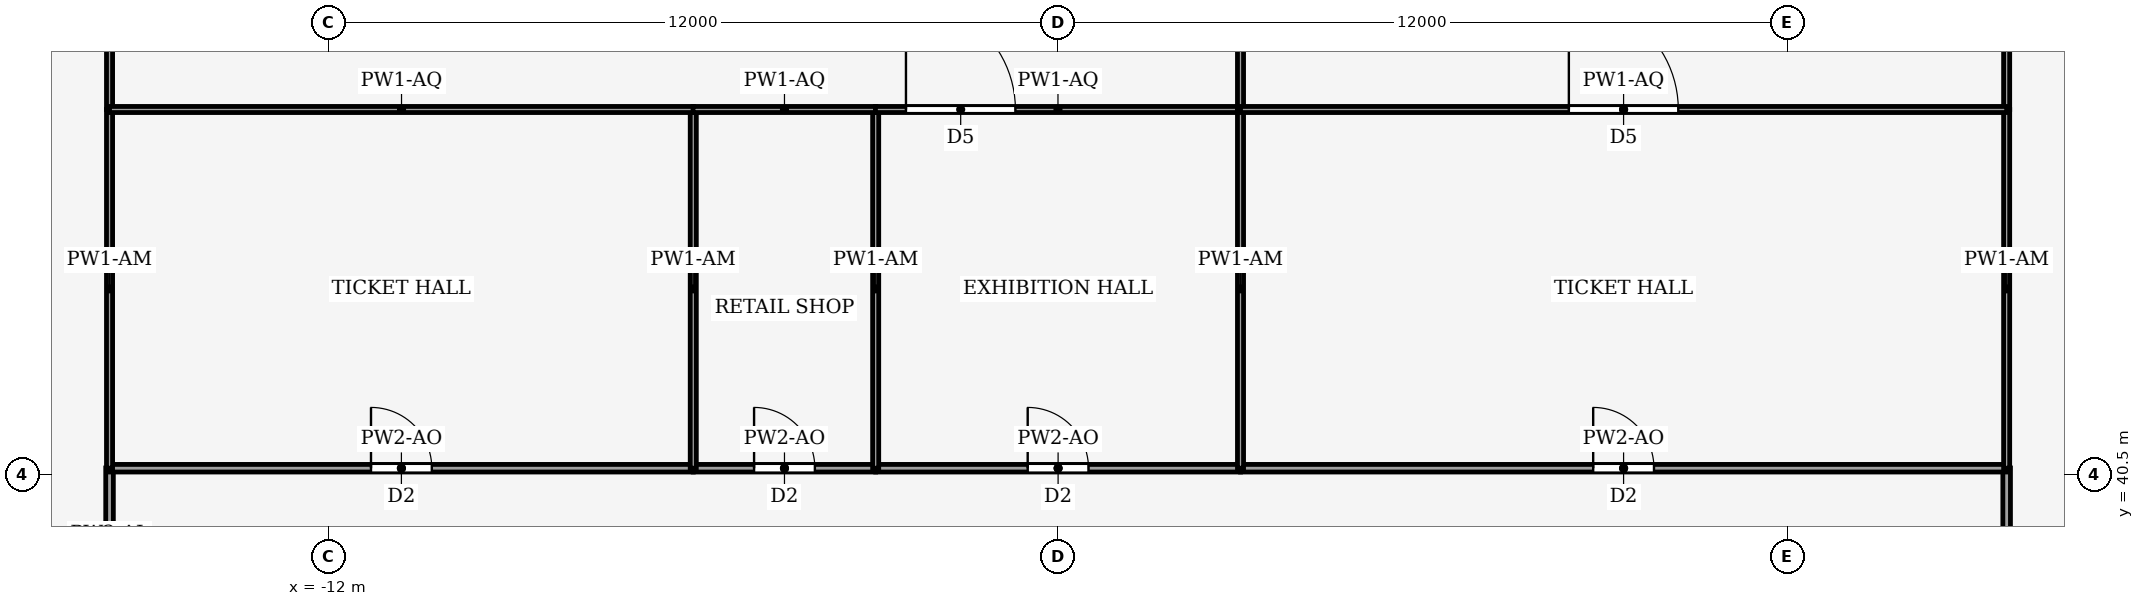
"""IFC4 building model, lengths in metres.
Left out: names, types, materials, properties, quantities, classifications, styles, units other than length and angle.
Written with IfcOpenShell. Run it as: python <this file> out.ifc"""

import sys

from ifc_helpers import new_model, si_unit, direction, frame, frame_2d, origin, place, context, subcontext, project, spatial, rectangle, extrude, element, fill, save


model = new_model("IFC4")
c1 = context("Model", 3, precision=1e-05, world=origin(), true_north=direction((0.0, 1.0)))
c2 = subcontext(c1, "Body", "Model", "MODEL_VIEW")
j1 = project(units=[si_unit("LENGTHUNIT", "METRE"), si_unit("PLANEANGLEUNIT", "RADIAN")], contexts=[c1])
p1 = place(None, origin())
s1 = spatial("IfcSite", under=j1, at=p1, CompositionType="ELEMENT")
p2 = place(p1, origin())
s2 = spatial("IfcBuilding", under=s1, at=p2, CompositionType="ELEMENT")
p3 = place(p2, frame((0.0, 0.0, 334.0)))
s3 = spatial("IfcBuildingStorey", under=s2, at=p3, CompositionType="ELEMENT", Elevation=334.0)
p4 = place(p3, frame((-15.6, 37.5, 0.0), z_axis=(0.0, 0.0, 1.0), x_axis=(0.0, 1.0, 0.0)))
e1 = element("IfcWall", 1, at=p4, inside=s3, PredefinedType="PARTITIONING", context=c2, shape_type="SweptSolid", body=[
    extrude(rectangle(XDim=3.104, YDim=0.125, at=frame_2d((1.552, 0.0))), origin(), (0.0, 0.0, 1.0), 5.62),
])
p5 = place(p4, frame((0.252, 0.0, 0.0)))
e2 = element("IfcOpeningElement", 2, at=p5, cuts=e1, PredefinedType="OPENING", context=c2, shape_type="SweptSolid", body=[
    extrude(rectangle(XDim=1.0, YDim=2.1, at=frame_2d((0.5, 1.05))), frame((0.0, 0.073, 0.0), z_axis=(0.0, -1.0, 0.0), x_axis=(1.0, 0.0, 0.0)), (0.0, 0.0, 1.0), 0.145),
])
p6 = place(p3, frame((15.6, 40.604, 0.0), z_axis=(0.0, 0.0, 1.0), x_axis=(0.0, -1.0, 0.0)))
e3 = element("IfcWall", 3, at=p6, inside=s3, PredefinedType="PARTITIONING", context=c2, shape_type="SweptSolid", body=[
    extrude(rectangle(XDim=6.104, YDim=0.125, at=frame_2d((3.052, 0.0))), origin(), (0.0, 0.0, 1.0), 5.62),
])
p7 = place(p6, frame((2.552, 0.0, 0.0)))
e4 = element("IfcOpeningElement", 4, at=p7, cuts=e3, PredefinedType="OPENING", context=c2, shape_type="SweptSolid", body=[
    extrude(rectangle(XDim=1.0, YDim=2.1, at=frame_2d((0.5, 1.05))), frame((0.0, 0.073, 0.0), z_axis=(0.0, -1.0, 0.0), x_axis=(1.0, 0.0, 0.0)), (0.0, 0.0, 1.0), 0.145),
])
p8 = place(p3, frame((-15.6, 40.6, 0.0), z_axis=(0.0, 0.0, 1.0), x_axis=(1.0, 0.0, 0.0)))
e5 = element("IfcWall", 5, at=p8, inside=s3, PredefinedType="PARTITIONING", context=c2, shape_type="SweptSolid", body=[
    extrude(rectangle(XDim=9.6, YDim=0.125, at=frame_2d((4.8, 0.0))), origin(), (0.0, 0.0, 1.0), 5.87),
])
p9 = place(p8, frame((4.3, 0.0, 0.0)))
e6 = element("IfcOpeningElement", 6, at=p9, cuts=e5, PredefinedType="OPENING", context=c2, shape_type="SweptSolid", body=[
    extrude(rectangle(XDim=1.0, YDim=2.1, at=frame_2d((0.5, 1.05))), frame((0.0, 0.073, 0.0), z_axis=(0.0, -1.0, 0.0), x_axis=(1.0, 0.0, 0.0)), (0.0, 0.0, 1.0), 0.145),
])
p10 = place(p3, frame((-6.0, 40.6, 0.0), z_axis=(0.0, 0.0, 1.0), x_axis=(1.0, 0.0, 0.0)))
e7 = element("IfcWall", 7, at=p10, inside=s3, PredefinedType="PARTITIONING", context=c2, shape_type="SweptSolid", body=[
    extrude(rectangle(XDim=3.0, YDim=0.125, at=frame_2d((1.5, 0.0))), origin(), (0.0, 0.0, 1.0), 5.87),
])
p11 = place(p10, frame((1.0, 0.0, 0.0)))
e8 = element("IfcOpeningElement", 8, at=p11, cuts=e7, PredefinedType="OPENING", context=c2, shape_type="SweptSolid", body=[
    extrude(rectangle(XDim=1.0, YDim=2.1, at=frame_2d((0.5, 1.05))), frame((0.0, 0.073, 0.0), z_axis=(0.0, -1.0, 0.0), x_axis=(1.0, 0.0, 0.0)), (0.0, 0.0, 1.0), 0.145),
])
p12 = place(p3, frame((-3.0, 40.6, 0.0), z_axis=(0.0, 0.0, 1.0), x_axis=(1.0, 0.0, 0.0)))
e9 = element("IfcWall", 9, at=p12, inside=s3, PredefinedType="PARTITIONING", context=c2, shape_type="SweptSolid", body=[
    extrude(rectangle(XDim=6.0, YDim=0.125, at=frame_2d((3.0, 0.0))), origin(), (0.0, 0.0, 1.0), 5.87),
])
p13 = place(p12, frame((2.5, 0.0, 0.0)))
e10 = element("IfcOpeningElement", 10, at=p13, cuts=e9, PredefinedType="OPENING", context=c2, shape_type="SweptSolid", body=[
    extrude(rectangle(XDim=1.0, YDim=2.1, at=frame_2d((0.5, 1.05))), frame((0.0, 0.073, 0.0), z_axis=(0.0, -1.0, 0.0), x_axis=(1.0, 0.0, 0.0)), (0.0, 0.0, 1.0), 0.145),
])
p14 = place(p3, frame((3.0, 40.6, 0.0), z_axis=(0.0, 0.0, 1.0), x_axis=(1.0, 0.0, 0.0)))
e11 = element("IfcWall", 11, at=p14, inside=s3, PredefinedType="PARTITIONING", context=c2, shape_type="SweptSolid", body=[
    extrude(rectangle(XDim=12.6, YDim=0.125, at=frame_2d((6.3, 0.0))), origin(), (0.0, 0.0, 1.0), 5.87),
])
p15 = place(p14, frame((5.8, 0.0, 0.0)))
e12 = element("IfcOpeningElement", 12, at=p15, cuts=e11, PredefinedType="OPENING", context=c2, shape_type="SweptSolid", body=[
    extrude(rectangle(XDim=1.0, YDim=2.1, at=frame_2d((0.5, 1.05))), frame((0.0, 0.073, 0.0), z_axis=(0.0, -1.0, 0.0), x_axis=(1.0, 0.0, 0.0)), (0.0, 0.0, 1.0), 0.145),
])
p16 = place(p3, frame((-15.6, 40.6, 0.0), z_axis=(0.0, 0.0, 1.0), x_axis=(0.0, 1.0, 0.0)))
e13 = element("IfcWall", 13, at=p16, inside=s3, PredefinedType="PARTITIONING", context=c2, shape_type="SweptSolid", body=[
    extrude(rectangle(XDim=5.9, YDim=0.1, at=frame_2d((2.95, 0.0))), origin(), (0.0, 0.0, 1.0), 6.35),
])
p17 = place(p3, frame((-15.6, 46.5, 0.0), z_axis=(0.0, 0.0, 1.0), x_axis=(0.0, 1.0, 0.0)))
e14 = element("IfcWall", 14, at=p17, inside=s3, PredefinedType="PARTITIONING", context=c2, shape_type="SweptSolid", body=[
    extrude(rectangle(XDim=15.0, YDim=0.1, at=frame_2d((7.5, 0.0))), origin(), (0.0, 0.0, 1.0), 5.83),
])
p18 = place(p3, frame((15.6, 46.5, 0.0), z_axis=(0.0, 0.0, 1.0), x_axis=(0.0, -1.0, 0.0)))
e15 = element("IfcWall", 15, at=p18, inside=s3, PredefinedType="PARTITIONING", context=c2, shape_type="SweptSolid", body=[
    extrude(rectangle(XDim=5.9, YDim=0.1, at=frame_2d((2.95, 0.0))), origin(), (0.0, 0.0, 1.0), 6.35),
])
p19 = place(p3, frame((15.6, 64.5, 0.0), z_axis=(0.0, 0.0, 1.0), x_axis=(0.0, -1.0, 0.0)))
e16 = element("IfcWall", 16, at=p19, inside=s3, PredefinedType="PARTITIONING", context=c2, shape_type="SweptSolid", body=[
    extrude(rectangle(XDim=18.0, YDim=0.1, at=frame_2d((9.0, 0.0))), origin(), (0.0, 0.0, 1.0), 5.83),
])
p20 = place(p3, frame((-6.0, 40.6, 0.0), z_axis=(0.0, 0.0, 1.0), x_axis=(0.0, 1.0, 0.0)))
e17 = element("IfcWall", 17, at=p20, inside=s3, PredefinedType="PARTITIONING", context=c2, shape_type="SweptSolid", body=[
    extrude(rectangle(XDim=5.9, YDim=0.1, at=frame_2d((2.95, 0.0))), origin(), (0.0, 0.0, 1.0), 6.35),
])
p21 = place(p3, frame((-5.996, 46.5, 0.0), z_axis=(0.0, 0.0, 1.0), x_axis=(-1.0, 0.0, 0.0)))
e18 = element("IfcWall", 18, at=p21, inside=s3, PredefinedType="PARTITIONING", context=c2, shape_type="SweptSolid", body=[
    extrude(rectangle(XDim=9.604, YDim=0.1, at=frame_2d((4.802, 0.0))), origin(), (0.0, 0.0, 1.0), 5.87),
])
p22 = place(p3, frame((-3.0, 40.6, 0.0), z_axis=(0.0, 0.0, 1.0), x_axis=(0.0, 1.0, 0.0)))
e19 = element("IfcWall", 19, at=p22, inside=s3, PredefinedType="PARTITIONING", context=c2, shape_type="SweptSolid", body=[
    extrude(rectangle(XDim=5.9, YDim=0.1, at=frame_2d((2.95, 0.0))), origin(), (0.0, 0.0, 1.0), 6.35),
])
p23 = place(p3, frame((-2.996, 46.5, 0.0), z_axis=(0.0, 0.0, 1.0), x_axis=(-1.0, 0.0, 0.0)))
e20 = element("IfcWall", 20, at=p23, inside=s3, PredefinedType="PARTITIONING", context=c2, shape_type="SweptSolid", body=[
    extrude(rectangle(XDim=3.008, YDim=0.1, at=frame_2d((1.504, 0.0))), origin(), (0.0, 0.0, 1.0), 5.87),
])
p24 = place(p3, frame((-3.004, 46.5, 0.0), z_axis=(0.0, 0.0, 1.0), x_axis=(1.0, 0.0, 0.0)))
e21 = element("IfcWall", 21, at=p24, inside=s3, PredefinedType="PARTITIONING", context=c2, shape_type="SweptSolid", body=[
    extrude(rectangle(XDim=6.004, YDim=0.1, at=frame_2d((3.002, 0.0))), origin(), (0.0, 0.0, 1.0), 5.87),
])
p25 = place(p24, frame((0.502, 0.0, 0.0)))
e22 = element("IfcOpeningElement", 22, at=p25, cuts=e21, PredefinedType="OPENING", context=c2, shape_type="SweptSolid", body=[
    extrude(rectangle(XDim=1.8, YDim=2.1, at=frame_2d((0.9, 1.05))), frame((0.0, 0.06, 0.0), z_axis=(0.0, -1.0, 0.0), x_axis=(1.0, 0.0, 0.0)), (0.0, 0.0, 1.0), 0.12),
])
p26 = place(p3, frame((3.0, 40.6, 0.0), z_axis=(0.0, 0.0, 1.0), x_axis=(0.0, 1.0, 0.0)))
e23 = element("IfcWall", 23, at=p26, inside=s3, PredefinedType="PARTITIONING", context=c2, shape_type="SweptSolid", body=[
    extrude(rectangle(XDim=5.9, YDim=0.1, at=frame_2d((2.95, 0.0))), origin(), (0.0, 0.0, 1.0), 6.35),
])
p27 = place(p3, frame((3.0, 46.5, 0.0), z_axis=(0.0, 0.0, 1.0), x_axis=(0.0, 1.0, 0.0)))
e24 = element("IfcWall", 24, at=p27, inside=s3, PredefinedType="PARTITIONING", context=c2, shape_type="SweptSolid", body=[
    extrude(rectangle(XDim=15.004, YDim=0.1, at=frame_2d((7.502, 0.0))), origin(), (0.0, 0.0, 1.0), 5.72),
])
p28 = place(p3, frame((3.0, 46.5, 0.0), z_axis=(0.0, 0.0, 1.0), x_axis=(1.0, 0.0, 0.0)))
e25 = element("IfcWall", 25, at=p28, inside=s3, PredefinedType="PARTITIONING", context=c2, shape_type="SweptSolid", body=[
    extrude(rectangle(XDim=12.6, YDim=0.1, at=frame_2d((6.3, 0.0))), origin(), (0.0, 0.0, 1.0), 5.87),
])
p29 = place(p28, frame((5.4, 0.0, 0.0)))
e26 = element("IfcOpeningElement", 26, at=p29, cuts=e25, PredefinedType="OPENING", context=c2, shape_type="SweptSolid", body=[
    extrude(rectangle(XDim=1.8, YDim=2.1, at=frame_2d((0.9, 1.05))), frame((0.0, 0.06, 0.0), z_axis=(0.0, -1.0, 0.0), x_axis=(1.0, 0.0, 0.0)), (0.0, 0.0, 1.0), 0.12),
])
p30 = place(p9, origin())
e27 = element("IfcDoor", 27, at=p30, inside=s3, OperationType="SINGLE_SWING_LEFT", PredefinedType="DOOR", context=c2, shape_type="SweptSolid", body=[
    extrude(rectangle(XDim=1.0, YDim=2.1, at=frame_2d((0.5, 1.05))), frame((0.0, 0.025, 0.0), z_axis=(0.0, -1.0, 0.0), x_axis=(1.0, 0.0, 0.0)), (0.0, 0.0, 1.0), 0.05),
])
fill(e6, e27)
p31 = place(p11, origin())
e28 = element("IfcDoor", 28, at=p31, inside=s3, OperationType="SINGLE_SWING_RIGHT", PredefinedType="DOOR", context=c2, shape_type="SweptSolid", body=[
    extrude(rectangle(XDim=1.0, YDim=2.1, at=frame_2d((0.5, 1.05))), frame((0.0, 0.025, 0.0), z_axis=(0.0, -1.0, 0.0), x_axis=(1.0, 0.0, 0.0)), (0.0, 0.0, 1.0), 0.05),
])
fill(e8, e28)
p32 = place(p13, origin())
e29 = element("IfcDoor", 29, at=p32, inside=s3, OperationType="SINGLE_SWING_LEFT", PredefinedType="DOOR", context=c2, shape_type="SweptSolid", body=[
    extrude(rectangle(XDim=1.0, YDim=2.1, at=frame_2d((0.5, 1.05))), frame((0.0, 0.025, 0.0), z_axis=(0.0, -1.0, 0.0), x_axis=(1.0, 0.0, 0.0)), (0.0, 0.0, 1.0), 0.05),
])
fill(e10, e29)
p33 = place(p15, origin())
e30 = element("IfcDoor", 30, at=p33, inside=s3, OperationType="SINGLE_SWING_RIGHT", PredefinedType="DOOR", context=c2, shape_type="SweptSolid", body=[
    extrude(rectangle(XDim=1.0, YDim=2.1, at=frame_2d((0.5, 1.05))), frame((0.0, 0.025, 0.0), z_axis=(0.0, -1.0, 0.0), x_axis=(1.0, 0.0, 0.0)), (0.0, 0.0, 1.0), 0.05),
])
fill(e12, e30)
p34 = place(p25, origin())
e31 = element("IfcDoor", 31, at=p34, inside=s3, OperationType="DOUBLE_DOOR_SINGLE_SWING", PredefinedType="DOOR", context=c2, shape_type="SweptSolid", body=[
    extrude(rectangle(XDim=1.8, YDim=2.1, at=frame_2d((0.9, 1.05))), frame((0.0, 0.025, 0.0), z_axis=(0.0, -1.0, 0.0), x_axis=(1.0, 0.0, 0.0)), (0.0, 0.0, 1.0), 0.05),
])
fill(e22, e31)
p35 = place(p29, origin())
e32 = element("IfcDoor", 32, at=p35, inside=s3, OperationType="DOUBLE_DOOR_SINGLE_SWING", PredefinedType="DOOR", context=c2, shape_type="SweptSolid", body=[
    extrude(rectangle(XDim=1.8, YDim=2.1, at=frame_2d((0.9, 1.05))), frame((0.0, 0.025, 0.0), z_axis=(0.0, -1.0, 0.0), x_axis=(1.0, 0.0, 0.0)), (0.0, 0.0, 1.0), 0.05),
])
fill(e26, e32)
save(model, sys.argv[1])
